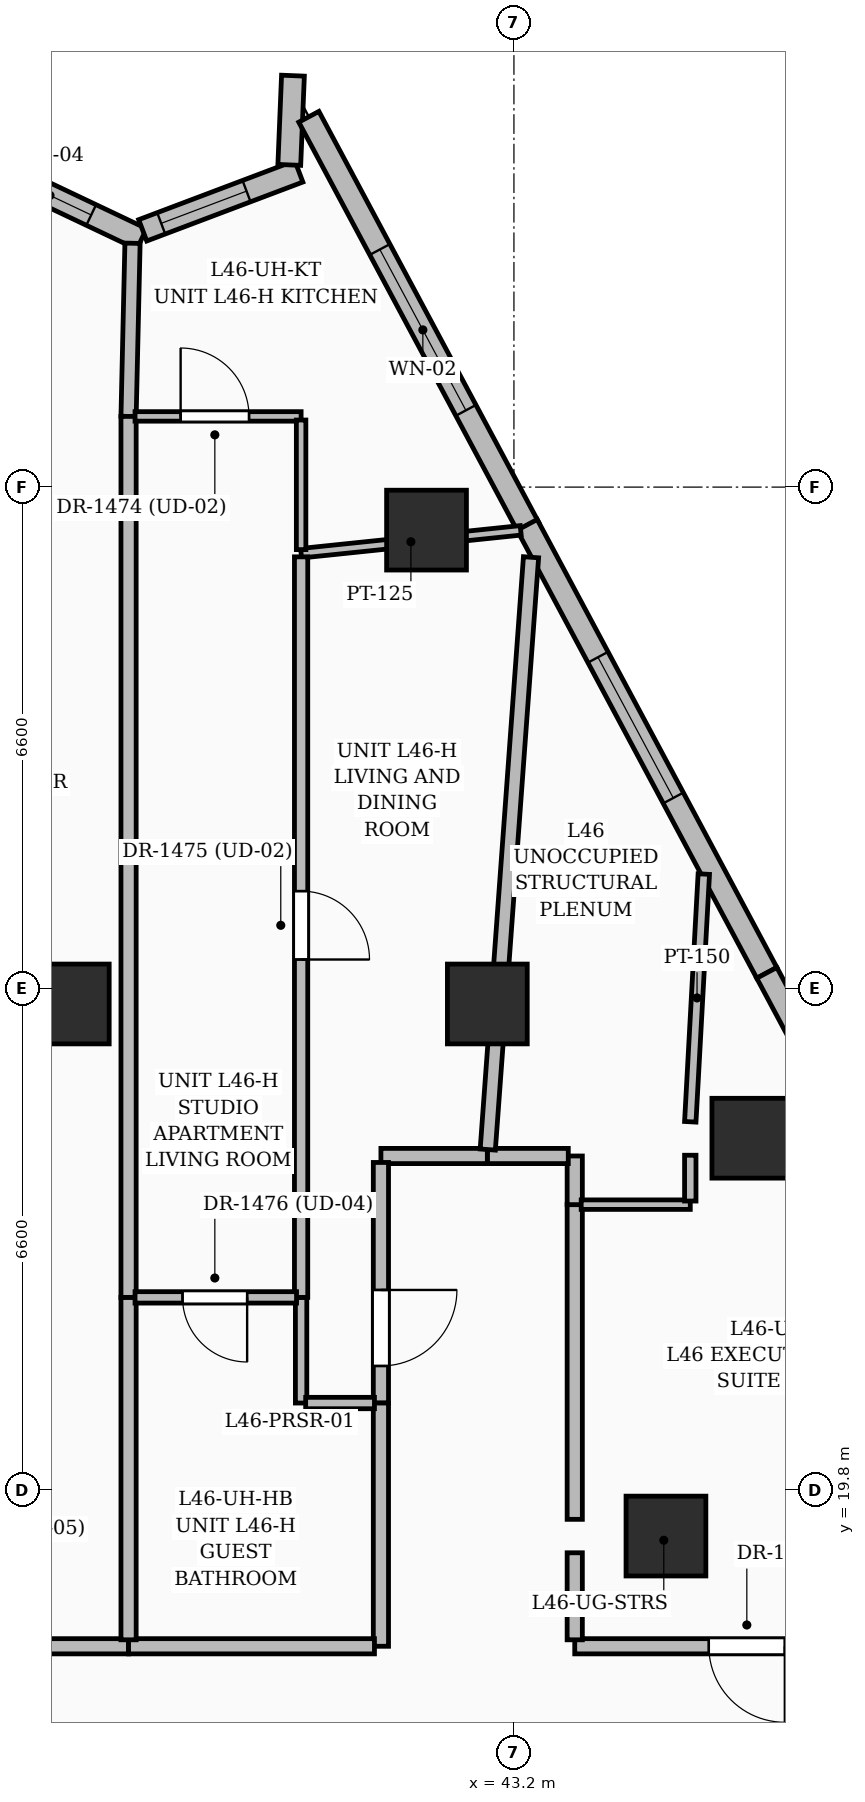
"""IFC4 building model, lengths in metres.
Left out: names, types, materials, properties, quantities, classifications, styles, units other than length and angle.
Written with IfcOpenShell. Run it as: python <this file> out.ifc"""

import sys

from ifc_helpers import new_model, si_unit, direction, frame, frame_2d, origin, origin_2d, place, context, subcontext, project, spatial, rectangle, extrude, element, fill, save


model = new_model("IFC4")
c1 = context("Model", 3, precision=1e-05, world=origin(), true_north=direction((0.0, 1.0)))
c2 = subcontext(c1, "Body", "Model", "MODEL_VIEW")
j1 = project(units=[si_unit("LENGTHUNIT", "METRE"), si_unit("PLANEANGLEUNIT", "RADIAN")], contexts=[c1])
p1 = place(None, origin())
s1 = spatial("IfcSite", under=j1, at=p1, CompositionType="ELEMENT")
p2 = place(p1, origin())
s2 = spatial("IfcBuilding", under=s1, at=p2, CompositionType="ELEMENT")
p3 = place(p2, frame((0.0, 0.0, 178.8)))
s3 = spatial("IfcBuildingStorey", under=s2, at=p3, CompositionType="ELEMENT", Elevation=178.8)
for number, where, z_axis, x_axis in (
    (1, (45.2, 19.2, 0.0), (0.0, 0.0, 1.0), (1.0, 0.0, 0.0)),
    (2, (42.85, 26.2, 0.0), (0.0, 0.0, 1.0), (1.0, 0.0, 0.0)),
    (3, (37.35, 26.2, 0.0), (0.0, 0.0, 1.0), (1.0, 0.0, 0.0)),
    (4, (46.33, 24.434, 0.0), (0.0, 0.0, 1.0), (1.0, 0.0, 0.0)),
    (5, (42.05, 32.434, 0.0), (0.0, 0.0, 1.0), (1.0, 0.0, 0.0)),
):
    element("IfcColumn", number, at=place(p3, frame(where, z_axis=z_axis, x_axis=x_axis)), inside=s3, PredefinedType="COLUMN", context=c2, shape_type="SweptSolid", body=[
        extrude(rectangle(XDim=1.05, YDim=1.05, at=origin_2d()), origin(), (0.0, 0.0, 1.0), 3.6),
    ])
p4 = place(p3, frame((36.311, 37.21, 0.0), z_axis=(0.0, 0.0, 1.0), x_axis=(0.903471604204, -0.428647944585, 0.0)))
e6 = element("IfcWall", 6, at=p4, inside=s3, PredefinedType="SOLIDWALL", context=c2, shape_type="SweptSolid", body=[
    extrude(rectangle(XDim=2.205, YDim=0.3, at=frame_2d((1.103, 0.0))), origin(), (0.0, 0.0, 1.0), 3.35),
])
p5 = place(p4, frame((0.27, 0.0, 0.8)))
e7 = element("IfcOpeningElement", 7, at=p5, cuts=e6, PredefinedType="OPENING", context=c2, shape_type="SweptSolid", body=[
    extrude(rectangle(XDim=1.2, YDim=1.8, at=frame_2d((0.6, 0.9))), frame((0.0, 0.16, 0.0), z_axis=(0.0, -1.0, 0.0), x_axis=(1.0, 0.0, 0.0)), (0.0, 0.0, 1.0), 0.32),
])
p6 = place(p3, frame((38.316, 36.378, 0.0), z_axis=(0.0, 0.0, 1.0), x_axis=(0.935503953589, 0.353316222129, 0.0)))
e8 = element("IfcWall", 8, at=p6, inside=s3, PredefinedType="SOLIDWALL", context=c2, shape_type="SweptSolid", body=[
    extrude(rectangle(XDim=2.195, YDim=0.3, at=frame_2d((1.098, 0.0))), origin(), (0.0, 0.0, 1.0), 3.35),
])
p7 = place(p6, frame((0.26, 0.0, 0.8)))
e9 = element("IfcOpeningElement", 9, at=p7, cuts=e8, PredefinedType="OPENING", context=c2, shape_type="SweptSolid", body=[
    extrude(rectangle(XDim=1.2, YDim=1.8, at=frame_2d((0.6, 0.9))), frame((0.0, 0.16, 0.0), z_axis=(0.0, -1.0, 0.0), x_axis=(1.0, 0.0, 0.0)), (0.0, 0.0, 1.0), 0.32),
])
p8 = place(p3, frame((40.245, 37.239, 0.0), z_axis=(0.0, 0.0, 1.0), x_axis=(0.040939027533, 0.999161646594, 0.0)))
e10 = element("IfcWall", 10, at=p8, inside=s3, PredefinedType="SOLIDWALL", context=c2, shape_type="SweptSolid", body=[
    extrude(rectangle(XDim=1.175, YDim=0.3, at=frame_2d((0.587, 0.0))), origin(), (0.0, 0.0, 1.0), 3.35),
])
p9 = place(p3, frame((40.502, 37.872, 0.0), z_axis=(0.0, 0.0, 1.0), x_axis=(0.471717097929, -0.881749952946, 0.0)))
e11 = element("IfcWall", 11, at=p9, inside=s3, PredefinedType="SOLIDWALL", context=c2, shape_type="SweptSolid", body=[
    extrude(rectangle(XDim=6.127, YDim=0.3, at=frame_2d((3.063, 0.0))), origin(), (0.0, 0.0, 1.0), 3.35),
])
p10 = place(p9, frame((1.98, 0.0, 0.6)))
e12 = element("IfcOpeningElement", 12, at=p10, cuts=e11, PredefinedType="OPENING", context=c2, shape_type="SweptSolid", body=[
    extrude(rectangle(XDim=2.4, YDim=2.1, at=frame_2d((1.2, 1.05))), frame((0.0, 0.16, 0.0), z_axis=(0.0, -1.0, 0.0), x_axis=(1.0, 0.0, 0.0)), (0.0, 0.0, 1.0), 0.32),
])
p11 = place(p3, frame((43.374, 32.503, 0.0), z_axis=(0.0, 0.0, 1.0), x_axis=(0.471750001728, -0.881732349338, 0.0)))
e13 = element("IfcWall", 13, at=p11, inside=s3, PredefinedType="SOLIDWALL", context=c2, shape_type="SweptSolid", body=[
    extrude(rectangle(XDim=6.684, YDim=0.3, at=frame_2d((3.342, 0.0))), origin(), (0.0, 0.0, 1.0), 3.35),
])
p12 = place(p11, frame((1.975, 0.0, 0.55)))
e14 = element("IfcOpeningElement", 14, at=p12, cuts=e13, PredefinedType="OPENING", context=c2, shape_type="SweptSolid", body=[
    extrude(rectangle(XDim=2.1, YDim=2.4, at=frame_2d((1.05, 1.2))), frame((0.0, 0.16, 0.0), z_axis=(0.0, -1.0, 0.0), x_axis=(1.0, 0.0, 0.0)), (0.0, 0.0, 1.0), 0.32),
])
p13 = place(p3, frame((46.527, 26.61, 0.0), z_axis=(0.0, 0.0, 1.0), x_axis=(0.471721602778, -0.881747542935, 0.0)))
e15 = element("IfcWall", 15, at=p13, inside=s3, PredefinedType="SOLIDWALL", context=c2, shape_type="SweptSolid", body=[
    extrude(rectangle(XDim=6.684, YDim=0.3, at=frame_2d((3.342, 0.0))), origin(), (0.0, 0.0, 1.0), 3.35),
])
p14 = place(p13, frame((3.75, 0.0, 0.6)))
e16 = element("IfcOpeningElement", 16, at=p14, cuts=e15, PredefinedType="OPENING", context=c2, shape_type="SweptSolid", body=[
    extrude(rectangle(XDim=1.8, YDim=2.1, at=frame_2d((0.9, 1.05))), frame((0.0, 0.16, 0.0), z_axis=(0.0, -1.0, 0.0), x_axis=(1.0, 0.0, 0.0)), (0.0, 0.0, 1.0), 0.32),
])
p15 = place(p13, frame((0.75, 0.0, 0.6)))
e17 = element("IfcOpeningElement", 17, at=p15, cuts=e15, PredefinedType="OPENING", context=c2, shape_type="SweptSolid", body=[
    extrude(rectangle(XDim=1.8, YDim=2.1, at=frame_2d((0.9, 1.05))), frame((0.0, 0.16, 0.0), z_axis=(0.0, -1.0, 0.0), x_axis=(1.0, 0.0, 0.0)), (0.0, 0.0, 1.0), 0.32),
])
p16 = place(p3, frame((38.13, 17.75, 0.0), z_axis=(0.0, 0.0, 1.0), x_axis=(-1.0, 0.0, 0.0)))
e18 = element("IfcWall", 18, at=p16, inside=s3, PredefinedType="PARTITIONING", context=c2, shape_type="SweptSolid", body=[
    extrude(rectangle(XDim=4.73, YDim=0.2, at=frame_2d((2.365, 0.0))), origin(), (0.0, 0.0, 1.0), 2.436),
])
p17 = place(p16, frame((1.565, 0.0, 0.0)))
e19 = element("IfcOpeningElement", 19, at=p17, cuts=e18, PredefinedType="OPENING", context=c2, shape_type="SweptSolid", body=[
    extrude(rectangle(XDim=1.6, YDim=2.3, at=frame_2d((0.8, 1.15))), frame((0.0, 0.11, 0.0), z_axis=(0.0, -1.0, 0.0), x_axis=(1.0, 0.0, 0.0)), (0.0, 0.0, 1.0), 0.22),
])
p18 = place(p3, frame((47.6, 17.75, 0.0), z_axis=(0.0, 0.0, 1.0), x_axis=(-1.0, 0.0, 0.0)))
e20 = element("IfcWall", 20, at=p18, inside=s3, PredefinedType="PARTITIONING", context=c2, shape_type="SweptSolid", body=[
    extrude(rectangle(XDim=3.6, YDim=0.2, at=frame_2d((1.8, 0.0))), origin(), (0.0, 0.0, 1.0), 2.436),
])
p19 = place(p18, frame((0.836, 0.0, 0.0)))
e21 = element("IfcOpeningElement", 21, at=p19, cuts=e20, PredefinedType="OPENING", context=c2, shape_type="SweptSolid", body=[
    extrude(rectangle(XDim=1.0, YDim=2.2, at=frame_2d((0.5, 1.1))), frame((0.0, 0.11, 0.0), z_axis=(0.0, -1.0, 0.0), x_axis=(1.0, 0.0, 0.0)), (0.0, 0.0, 1.0), 0.22),
])
p20 = place(p3, frame((44.0, 17.835, 0.0), z_axis=(0.0, 0.0, 1.0), x_axis=(0.0, 1.0, 0.0)))
e22 = element("IfcWall", 22, at=p20, inside=s3, PredefinedType="PARTITIONING", context=c2, shape_type="SweptSolid", body=[
    extrude(rectangle(XDim=1.145, YDim=0.2, at=frame_2d((0.573, 0.0))), origin(), (0.0, 0.0, 1.0), 3.35),
])
p21 = place(p3, frame((44.0, 19.42, 0.0), z_axis=(0.0, 0.0, 1.0), x_axis=(0.0, 1.0, 0.0)))
e23 = element("IfcWall", 23, at=p21, inside=s3, PredefinedType="PARTITIONING", context=c2, shape_type="SweptSolid", body=[
    extrude(rectangle(XDim=4.14, YDim=0.2, at=frame_2d((2.07, 0.0))), origin(), (0.0, 0.0, 1.0), 2.436),
])
p22 = place(p3, frame((44.0, 23.56, 0.0), z_axis=(0.0, 0.0, 1.0), x_axis=(0.0, 1.0, 0.0)))
e24 = element("IfcWall", 24, at=p22, inside=s3, PredefinedType="PARTITIONING", context=c2, shape_type="SweptSolid", body=[
    extrude(rectangle(XDim=0.64, YDim=0.2, at=frame_2d((0.32, 0.0))), origin(), (0.0, 0.0, 1.0), 2.436),
])
p23 = place(p3, frame((43.915, 24.2, 0.0), z_axis=(0.0, 0.0, 1.0), x_axis=(-1.0, 0.0, 0.0)))
e25 = element("IfcWall", 25, at=p23, inside=s3, PredefinedType="PARTITIONING", context=c2, shape_type="SweptSolid", body=[
    extrude(rectangle(XDim=1.065, YDim=0.2, at=frame_2d((0.532, 0.0))), origin(), (0.0, 0.0, 1.0), 2.436),
])
p24 = place(p3, frame((42.85, 24.2, 0.0), z_axis=(0.0, 0.0, 1.0), x_axis=(-1.0, 0.0, 0.0)))
e26 = element("IfcWall", 26, at=p24, inside=s3, PredefinedType="PARTITIONING", context=c2, shape_type="SweptSolid", body=[
    extrude(rectangle(XDim=1.4, YDim=0.2, at=frame_2d((0.7, 0.0))), origin(), (0.0, 0.0, 1.0), 3.35),
])
p25 = place(p3, frame((41.45, 24.115, 0.0), z_axis=(0.0, 0.0, 1.0), x_axis=(0.0, -1.0, 0.0)))
e27 = element("IfcWall", 27, at=p25, inside=s3, PredefinedType="PARTITIONING", context=c2, shape_type="SweptSolid", body=[
    extrude(rectangle(XDim=3.165, YDim=0.2, at=frame_2d((1.583, 0.0))), origin(), (0.0, 0.0, 1.0), 3.35),
])
p26 = place(p25, frame((1.677, 0.0, 0.0)))
e28 = element("IfcOpeningElement", 28, at=p26, cuts=e27, PredefinedType="OPENING", context=c2, shape_type="SweptSolid", body=[
    extrude(rectangle(XDim=1.0, YDim=2.2, at=frame_2d((0.5, 1.1))), frame((0.0, 0.11, 0.0), z_axis=(0.0, -1.0, 0.0), x_axis=(1.0, 0.0, 0.0)), (0.0, 0.0, 1.0), 0.22),
])
p27 = place(p3, frame((41.45, 20.95, 0.0), z_axis=(0.0, 0.0, 1.0), x_axis=(0.0, -1.0, 0.0)))
e29 = element("IfcWall", 29, at=p27, inside=s3, PredefinedType="PARTITIONING", context=c2, shape_type="SweptSolid", body=[
    extrude(rectangle(XDim=3.2, YDim=0.2, at=frame_2d((1.6, 0.0))), origin(), (0.0, 0.0, 1.0), 3.35),
])
p28 = place(p3, frame((41.365, 17.75, 0.0), z_axis=(0.0, 0.0, 1.0), x_axis=(-1.0, 0.0, 0.0)))
e30 = element("IfcWall", 30, at=p28, inside=s3, PredefinedType="PARTITIONING", context=c2, shape_type="SweptSolid", body=[
    extrude(rectangle(XDim=3.235, YDim=0.2, at=frame_2d((1.618, 0.0))), origin(), (0.0, 0.0, 1.0), 3.35),
])
p29 = place(p3, frame((38.13, 17.835, 0.0), z_axis=(0.0, 0.0, 1.0), x_axis=(0.0, 1.0, 0.0)))
e31 = element("IfcWall", 31, at=p29, inside=s3, PredefinedType="PARTITIONING", context=c2, shape_type="SweptSolid", body=[
    extrude(rectangle(XDim=4.505, YDim=0.2, at=frame_2d((2.252, 0.0))), origin(), (0.0, 0.0, 1.0), 3.35),
])
p30 = place(p3, frame((38.13, 33.93, 0.0), z_axis=(0.0, 0.0, 1.0), x_axis=(0.022821190318, 0.999739562722, 0.0)))
e32 = element("IfcWall", 32, at=p30, inside=s3, PredefinedType="PARTITIONING", context=c2, shape_type="SweptSolid", body=[
    extrude(rectangle(XDim=2.279, YDim=0.2, at=frame_2d((1.139, 0.0))), origin(), (0.0, 0.0, 1.0), 3.35),
])
p31 = place(p3, frame((38.13, 22.34, 0.0), z_axis=(0.0, 0.0, 1.0), x_axis=(0.0, 1.0, 0.0)))
e33 = element("IfcWall", 33, at=p31, inside=s3, PredefinedType="PARTITIONING", context=c2, shape_type="SweptSolid", body=[
    extrude(rectangle(XDim=11.59, YDim=0.2, at=frame_2d((5.795, 0.0))), origin(), (0.0, 0.0, 1.0), 2.436),
])
p32 = place(p3, frame((45.52, 23.56, 0.0), z_axis=(0.0, 0.0, 1.0), x_axis=(-1.0, 0.0, 0.0)))
e34 = element("IfcWall", 34, at=p32, inside=s3, PredefinedType="PARTITIONING", context=c2, shape_type="SweptSolid", body=[
    extrude(rectangle(XDim=1.435, YDim=0.125, at=frame_2d((0.718, 0.0))), origin(), (0.0, 0.0, 1.0), 2.911),
])
p33 = place(p3, frame((45.52, 24.21, 0.0), z_axis=(0.0, 0.0, 1.0), x_axis=(0.0, -1.0, 0.0)))
e35 = element("IfcWall", 35, at=p33, inside=s3, PredefinedType="PARTITIONING", context=c2, shape_type="SweptSolid", body=[
    extrude(rectangle(XDim=0.603, YDim=0.15, at=frame_2d((0.301, 0.0))), origin(), (0.0, 0.0, 1.0), 3.35),
])
p34 = place(p3, frame((45.698, 27.909, 0.0), z_axis=(0.0, 0.0, 1.0), x_axis=(-0.054529579852, -0.99851215562, 0.0)))
e36 = element("IfcWall", 36, at=p34, inside=s3, PredefinedType="PARTITIONING", context=c2, shape_type="SweptSolid", body=[
    extrude(rectangle(XDim=3.264, YDim=0.15, at=frame_2d((1.632, 0.0))), origin(), (0.0, 0.0, 1.0), 2.57),
])
p35 = place(p3, frame((43.425, 32.077, 0.0), z_axis=(0.0, 0.0, 1.0), x_axis=(-0.0728725349, -0.997341262386, 0.0)))
e37 = element("IfcWall", 37, at=p35, inside=s3, PredefinedType="PARTITIONING", context=c2, shape_type="SweptSolid", body=[
    extrude(rectangle(XDim=7.813, YDim=0.2, at=frame_2d((3.906, 0.0))), origin(), (0.0, 0.0, 1.0), 2.436),
])
p36 = place(p3, frame((40.4, 22.34, 0.0), z_axis=(0.0, 0.0, 1.0), x_axis=(0.0, -1.0, 0.0)))
e38 = element("IfcWall", 38, at=p36, inside=s3, PredefinedType="PARTITIONING", context=c2, shape_type="SweptSolid", body=[
    extrude(rectangle(XDim=1.39, YDim=0.15, at=frame_2d((0.695, 0.0))), origin(), (0.0, 0.0, 1.0), 3.35),
])
p37 = place(p3, frame((40.46, 20.95, 0.0), z_axis=(0.0, 0.0, 1.0), x_axis=(1.0, 0.0, 0.0)))
e39 = element("IfcWall", 39, at=p37, inside=s3, PredefinedType="PARTITIONING", context=c2, shape_type="SweptSolid", body=[
    extrude(rectangle(XDim=0.905, YDim=0.15, at=frame_2d((0.453, 0.0))), origin(), (0.0, 0.0, 1.0), 3.35),
])
p38 = place(p3, frame((43.289, 32.431, 0.0), z_axis=(0.0, 0.0, 1.0), x_axis=(-0.994615882484, -0.103630334891, 0.0)))
e40 = element("IfcWall", 40, at=p38, inside=s3, PredefinedType="PARTITIONING", context=c2, shape_type="SweptSolid", body=[
    extrude(rectangle(XDim=2.905, YDim=0.125, at=frame_2d((1.452, 0.0))), origin(), (0.0, 0.0, 1.0), 2.57),
])
p39 = place(p3, frame((40.4, 32.083, 0.0), z_axis=(0.0, 0.0, 1.0), x_axis=(0.0, -1.0, 0.0)))
e41 = element("IfcWall", 41, at=p39, inside=s3, PredefinedType="PARTITIONING", context=c2, shape_type="SweptSolid", body=[
    extrude(rectangle(XDim=9.742, YDim=0.175, at=frame_2d((4.871, 0.0))), origin(), (0.0, 0.0, 1.0), 2.436),
])
p40 = place(p39, frame((4.397, 0.0, 0.0)))
e42 = element("IfcOpeningElement", 42, at=p40, cuts=e41, PredefinedType="OPENING", context=c2, shape_type="SweptSolid", body=[
    extrude(rectangle(XDim=0.9, YDim=2.15, at=frame_2d((0.45, 1.075))), frame((0.0, 0.097, 0.0), z_axis=(0.0, -1.0, 0.0), x_axis=(1.0, 0.0, 0.0)), (0.0, 0.0, 1.0), 0.195),
])
p41 = place(p3, frame((40.34, 22.34, 0.0), z_axis=(0.0, 0.0, 1.0), x_axis=(-1.0, 0.0, 0.0)))
e43 = element("IfcWall", 43, at=p41, inside=s3, PredefinedType="PARTITIONING", context=c2, shape_type="SweptSolid", body=[
    extrude(rectangle(XDim=2.125, YDim=0.15, at=frame_2d((1.062, 0.0))), origin(), (0.0, 0.0, 1.0), 3.35),
])
p42 = place(p41, frame((0.65, 0.0, 0.0)))
e44 = element("IfcOpeningElement", 44, at=p42, cuts=e43, PredefinedType="OPENING", context=c2, shape_type="SweptSolid", body=[
    extrude(rectangle(XDim=0.85, YDim=2.1, at=frame_2d((0.425, 1.05))), frame((0.0, 0.085, 0.0), z_axis=(0.0, -1.0, 0.0), x_axis=(1.0, 0.0, 0.0)), (0.0, 0.0, 1.0), 0.17),
])
p43 = place(p3, frame((38.215, 33.93, 0.0), z_axis=(0.0, 0.0, 1.0), x_axis=(1.0, 0.0, 0.0)))
e45 = element("IfcWall", 45, at=p43, inside=s3, PredefinedType="PARTITIONING", context=c2, shape_type="SweptSolid", body=[
    extrude(rectangle(XDim=2.185, YDim=0.125, at=frame_2d((1.092, 0.0))), origin(), (0.0, 0.0, 1.0), 3.35),
])
p44 = place(p43, frame((0.6, 0.0, 0.0)))
e46 = element("IfcOpeningElement", 46, at=p44, cuts=e45, PredefinedType="OPENING", context=c2, shape_type="SweptSolid", body=[
    extrude(rectangle(XDim=0.9, YDim=2.15, at=frame_2d((0.45, 1.075))), frame((0.0, 0.072, 0.0), z_axis=(0.0, -1.0, 0.0), x_axis=(1.0, 0.0, 0.0)), (0.0, 0.0, 1.0), 0.145),
])
p45 = place(p3, frame((40.4, 33.883, 0.0), z_axis=(0.0, 0.0, 1.0), x_axis=(0.0, -1.0, 0.0)))
e47 = element("IfcWall", 47, at=p45, inside=s3, PredefinedType="PARTITIONING", context=c2, shape_type="SweptSolid", body=[
    extrude(rectangle(XDim=1.705, YDim=0.125, at=frame_2d((0.853, 0.0))), origin(), (0.0, 0.0, 1.0), 2.57),
])
p46 = place(p5, origin())
e48 = element("IfcWindow", 48, at=p46, inside=s3, PartitioningType="SINGLE_PANEL", PredefinedType="WINDOW", context=c2, shape_type="SweptSolid", body=[
    extrude(rectangle(XDim=1.2, YDim=1.8, at=frame_2d((0.6, 0.9))), frame((0.0, 0.03, 0.0), z_axis=(0.0, -1.0, 0.0), x_axis=(1.0, 0.0, 0.0)), (0.0, 0.0, 1.0), 0.06),
])
fill(e7, e48)
p47 = place(p7, origin())
e49 = element("IfcWindow", 49, at=p47, inside=s3, PartitioningType="SINGLE_PANEL", PredefinedType="WINDOW", context=c2, shape_type="SweptSolid", body=[
    extrude(rectangle(XDim=1.2, YDim=1.8, at=frame_2d((0.6, 0.9))), frame((0.0, 0.03, 0.0), z_axis=(0.0, -1.0, 0.0), x_axis=(1.0, 0.0, 0.0)), (0.0, 0.0, 1.0), 0.06),
])
fill(e9, e49)
p48 = place(p10, origin())
e50 = element("IfcWindow", 50, at=p48, inside=s3, PartitioningType="SINGLE_PANEL", PredefinedType="WINDOW", context=c2, shape_type="SweptSolid", body=[
    extrude(rectangle(XDim=2.4, YDim=2.1, at=frame_2d((1.2, 1.05))), frame((0.0, 0.03, 0.0), z_axis=(0.0, -1.0, 0.0), x_axis=(1.0, 0.0, 0.0)), (0.0, 0.0, 1.0), 0.06),
])
fill(e12, e50)
p49 = place(p12, origin())
e51 = element("IfcWindow", 51, at=p49, inside=s3, PartitioningType="SINGLE_PANEL", PredefinedType="WINDOW", context=c2, shape_type="SweptSolid", body=[
    extrude(rectangle(XDim=2.1, YDim=2.4, at=frame_2d((1.05, 1.2))), frame((0.0, 0.03, 0.0), z_axis=(0.0, -1.0, 0.0), x_axis=(1.0, 0.0, 0.0)), (0.0, 0.0, 1.0), 0.06),
])
fill(e14, e51)
p50 = place(p19, origin())
e52 = element("IfcDoor", 52, at=p50, inside=s3, OperationType="SINGLE_SWING_LEFT", PredefinedType="DOOR", context=c2, shape_type="SweptSolid", body=[
    extrude(rectangle(XDim=1.0, YDim=2.2, at=frame_2d((0.5, 1.1))), frame((0.0, 0.025, 0.0), z_axis=(0.0, -1.0, 0.0), x_axis=(1.0, 0.0, 0.0)), (0.0, 0.0, 1.0), 0.05),
])
fill(e21, e52)
p51 = place(p26, origin())
e53 = element("IfcDoor", 53, at=p51, inside=s3, OperationType="SINGLE_SWING_LEFT", PredefinedType="DOOR", context=c2, shape_type="SweptSolid", body=[
    extrude(rectangle(XDim=1.0, YDim=2.2, at=frame_2d((0.5, 1.1))), frame((0.0, 0.025, 0.0), z_axis=(0.0, -1.0, 0.0), x_axis=(1.0, 0.0, 0.0)), (0.0, 0.0, 1.0), 0.05),
])
fill(e28, e53)
p52 = place(p44, origin())
e54 = element("IfcDoor", 54, at=p52, inside=s3, OperationType="SINGLE_SWING_LEFT", PredefinedType="DOOR", context=c2, shape_type="SweptSolid", body=[
    extrude(rectangle(XDim=0.9, YDim=2.15, at=frame_2d((0.45, 1.075))), frame((0.0, 0.025, 0.0), z_axis=(0.0, -1.0, 0.0), x_axis=(1.0, 0.0, 0.0)), (0.0, 0.0, 1.0), 0.05),
])
fill(e46, e54)
p53 = place(p40, origin())
e55 = element("IfcDoor", 55, at=p53, inside=s3, OperationType="SINGLE_SWING_RIGHT", PredefinedType="DOOR", context=c2, shape_type="SweptSolid", body=[
    extrude(rectangle(XDim=0.9, YDim=2.15, at=frame_2d((0.45, 1.075))), frame((0.0, 0.025, 0.0), z_axis=(0.0, -1.0, 0.0), x_axis=(1.0, 0.0, 0.0)), (0.0, 0.0, 1.0), 0.05),
])
fill(e42, e55)
p54 = place(p42, origin())
e56 = element("IfcDoor", 56, at=p54, inside=s3, OperationType="SINGLE_SWING_LEFT", PredefinedType="DOOR", context=c2, shape_type="SweptSolid", body=[
    extrude(rectangle(XDim=0.85, YDim=2.1, at=frame_2d((0.425, 1.05))), frame((0.0, 0.025, 0.0), z_axis=(0.0, -1.0, 0.0), x_axis=(1.0, 0.0, 0.0)), (0.0, 0.0, 1.0), 0.05),
])
fill(e44, e56)
save(model, sys.argv[1])
